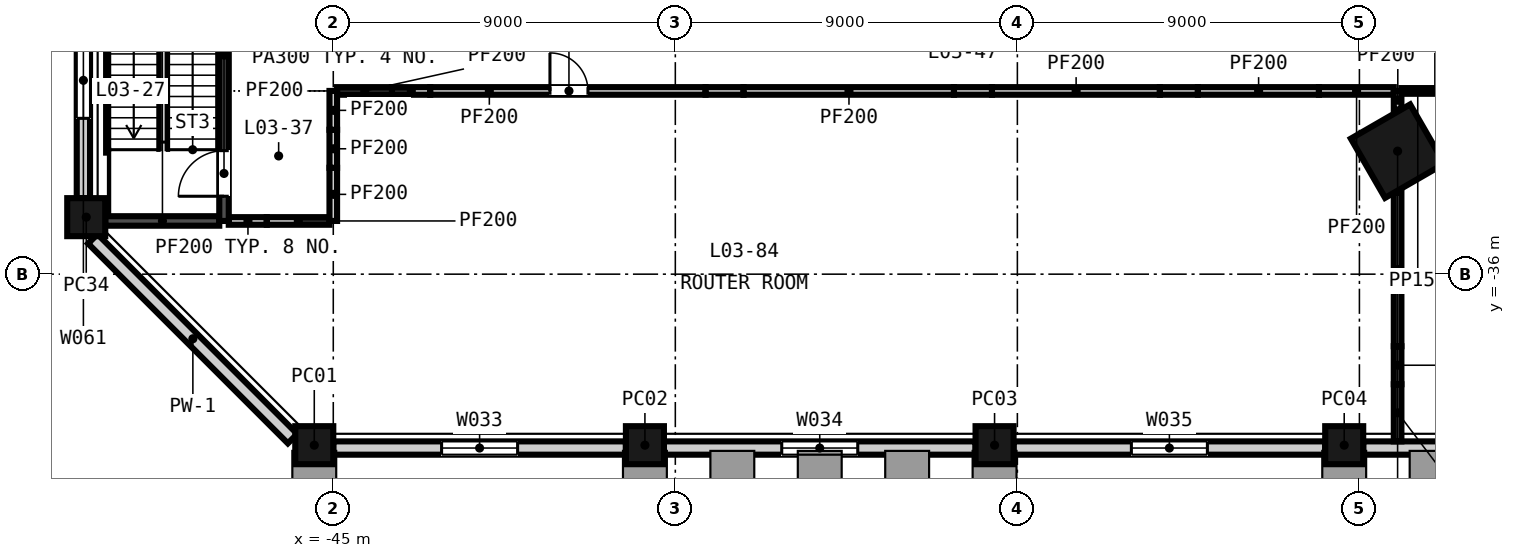
"""IFC4 building model, lengths in metres.
Left out: names, types, materials, properties, quantities, classifications, styles, units other than length and angle.
Written with IfcOpenShell. Run it as: python <this file> out.ifc"""

import sys

from ifc_helpers import new_model, si_unit, direction, frame, frame_2d, origin, origin_2d, place, context, subcontext, project, spatial, rectangle, extrude, element, fill, save


model = new_model("IFC4")
c1 = context("Model", 3, precision=1e-05, world=origin(), true_north=direction((0.0, 1.0)))
c2 = subcontext(c1, "Body", "Model", "MODEL_VIEW")
j1 = project(units=[si_unit("LENGTHUNIT", "METRE"), si_unit("PLANEANGLEUNIT", "RADIAN")], contexts=[c1])
p1 = place(None, origin())
s1 = spatial("IfcSite", under=j1, at=p1, CompositionType="ELEMENT")
p2 = place(p1, origin())
s2 = spatial("IfcBuilding", under=s1, at=p2, CompositionType="ELEMENT")
p3 = place(p2, frame((0.0, 0.0, 22.5)))
s3 = spatial("IfcBuildingStorey", under=s2, at=p3, CompositionType="ELEMENT", Elevation=22.5)
p4 = place(p3, frame((-16.995, -32.763, -0.3), z_axis=(0.0, 0.0, 1.0), x_axis=(0.5, -0.866025403784, 0.0)))
e1 = element("IfcColumn", 1, at=p4, inside=s3, PredefinedType="COLUMN", context=c2, shape_type="SweptSolid", body=[
    extrude(rectangle(XDim=1.8, YDim=1.8, at=origin_2d()), origin(), (0.0, 0.0, 1.0), 4.5),
])
for number, where, z_axis, x_axis in (
    (2, (-45.5, -40.5, -0.3), (0.0, 0.0, 1.0), (1.0, 0.0, 0.0)),
    (3, (-36.8, -40.5, -0.3), (0.0, 0.0, 1.0), (1.0, 0.0, 0.0)),
    (4, (-27.6, -40.5, -0.3), (0.0, 0.0, 1.0), (1.0, 0.0, 0.0)),
    (5, (-18.4, -40.5, -0.3), (0.0, 0.0, 1.0), (1.0, 0.0, 0.0)),
    (6, (-51.5, -34.5, -0.3), (0.0, 0.0, 1.0), (0.0, -1.0, 0.0)),
):
    element("IfcColumn", number, at=place(p3, frame(where, z_axis=z_axis, x_axis=x_axis)), inside=s3, PredefinedType="COLUMN", context=c2, shape_type="SweptSolid", body=[
        extrude(rectangle(XDim=1.0, YDim=1.0, at=origin_2d()), origin(), (0.0, 0.0, 1.0), 4.5),
    ])
p5 = place(p3, frame((-45.0, -40.575, -0.3), z_axis=(0.0, 0.0, 1.0), x_axis=(1.0, 0.0, 0.0)))
e7 = element("IfcWall", 7, at=p5, inside=s3, PredefinedType="SOLIDWALL", context=c2, shape_type="SweptSolid", body=[
    extrude(rectangle(XDim=7.7, YDim=0.35, at=frame_2d((3.85, 0.0))), origin(), (0.0, 0.0, 1.0), 3.6),
])
p6 = place(p5, frame((2.85, 0.0, 1.2)))
e8 = element("IfcOpeningElement", 8, at=p6, cuts=e7, PredefinedType="OPENING", context=c2, shape_type="SweptSolid", body=[
    extrude(rectangle(XDim=2.0, YDim=2.35, at=frame_2d((1.0, 1.175))), frame((0.0, 0.185, 0.0), z_axis=(0.0, -1.0, 0.0), x_axis=(1.0, 0.0, 0.0)), (0.0, 0.0, 1.0), 0.37),
])
p7 = place(p3, frame((-36.3, -40.575, -0.3), z_axis=(0.0, 0.0, 1.0), x_axis=(1.0, 0.0, 0.0)))
e9 = element("IfcWall", 9, at=p7, inside=s3, PredefinedType="SOLIDWALL", context=c2, shape_type="SweptSolid", body=[
    extrude(rectangle(XDim=8.2, YDim=0.35, at=frame_2d((4.1, 0.0))), origin(), (0.0, 0.0, 1.0), 3.6),
])
p8 = place(p7, frame((3.1, 0.0, 1.2)))
e10 = element("IfcOpeningElement", 10, at=p8, cuts=e9, PredefinedType="OPENING", context=c2, shape_type="SweptSolid", body=[
    extrude(rectangle(XDim=2.0, YDim=2.35, at=frame_2d((1.0, 1.175))), frame((0.0, 0.185, 0.0), z_axis=(0.0, -1.0, 0.0), x_axis=(1.0, 0.0, 0.0)), (0.0, 0.0, 1.0), 0.37),
])
p9 = place(p3, frame((-27.1, -40.575, -0.3), z_axis=(0.0, 0.0, 1.0), x_axis=(1.0, 0.0, 0.0)))
e11 = element("IfcWall", 11, at=p9, inside=s3, PredefinedType="SOLIDWALL", context=c2, shape_type="SweptSolid", body=[
    extrude(rectangle(XDim=8.2, YDim=0.35, at=frame_2d((4.1, 0.0))), origin(), (0.0, 0.0, 1.0), 3.6),
])
p10 = place(p9, frame((3.1, 0.0, 1.2)))
e12 = element("IfcOpeningElement", 12, at=p10, cuts=e11, PredefinedType="OPENING", context=c2, shape_type="SweptSolid", body=[
    extrude(rectangle(XDim=2.0, YDim=2.35, at=frame_2d((1.0, 1.175))), frame((0.0, 0.185, 0.0), z_axis=(0.0, -1.0, 0.0), x_axis=(1.0, 0.0, 0.0)), (0.0, 0.0, 1.0), 0.37),
])
p11 = place(p3, frame((-17.9, -40.575, -0.3), z_axis=(0.0, 0.0, 1.0), x_axis=(1.0, 0.0, 0.0)))
e13 = element("IfcWall", 13, at=p11, inside=s3, PredefinedType="SOLIDWALL", context=c2, shape_type="SweptSolid", body=[
    extrude(rectangle(XDim=8.2, YDim=0.35, at=frame_2d((4.1, 0.0))), origin(), (0.0, 0.0, 1.0), 3.6),
])
p12 = place(p11, frame((3.1, 0.0, 1.2)))
e14 = element("IfcOpeningElement", 14, at=p12, cuts=e13, PredefinedType="OPENING", context=c2, shape_type="SweptSolid", body=[
    extrude(rectangle(XDim=2.0, YDim=2.35, at=frame_2d((1.0, 1.175))), frame((0.0, 0.185, 0.0), z_axis=(0.0, -1.0, 0.0), x_axis=(1.0, 0.0, 0.0)), (0.0, 0.0, 1.0), 0.37),
])
p13 = place(p3, frame((-51.575, -27.8, -0.3), z_axis=(0.0, 0.0, 1.0), x_axis=(0.0, -1.0, 0.0)))
e15 = element("IfcWall", 15, at=p13, inside=s3, PredefinedType="SOLIDWALL", context=c2, shape_type="SweptSolid", body=[
    extrude(rectangle(XDim=6.2, YDim=0.35, at=frame_2d((3.1, 0.0))), origin(), (0.0, 0.0, 1.0), 3.6),
])
p14 = place(p13, frame((2.1, 0.0, 1.2)))
e16 = element("IfcOpeningElement", 16, at=p14, cuts=e15, PredefinedType="OPENING", context=c2, shape_type="SweptSolid", body=[
    extrude(rectangle(XDim=2.0, YDim=2.35, at=frame_2d((1.0, 1.175))), frame((0.0, 0.185, 0.0), z_axis=(0.0, -1.0, 0.0), x_axis=(1.0, 0.0, 0.0)), (0.0, 0.0, 1.0), 0.37),
])
p15 = place(p3, frame((-51.327, -35.072, -0.3), z_axis=(0.0, 0.0, 1.0), x_axis=(0.707106781187, -0.707106781187, 0.0)))
e17 = element("IfcWall", 17, at=p15, inside=s3, PredefinedType="SOLIDWALL", context=c2, shape_type="SweptSolid", body=[
    extrude(rectangle(XDim=7.433, YDim=0.35, at=frame_2d((3.716, 0.0))), origin(), (0.0, 0.0, 1.0), 3.6),
])
p16 = place(p3, frame((-51.0, -34.6, 0.0), z_axis=(0.0, 0.0, 1.0), x_axis=(1.0, 0.0, 0.0)))
e18 = element("IfcWall", 18, at=p16, inside=s3, PredefinedType="SHEAR", context=c2, shape_type="SweptSolid", body=[
    extrude(rectangle(XDim=3.0, YDim=0.25, at=frame_2d((1.5, 0.0))), origin(), (0.0, 0.0, 1.0), 4.2),
])
p17 = place(p3, frame((-47.75, -34.6, 0.0), z_axis=(0.0, 0.0, 1.0), x_axis=(1.0, 0.0, 0.0)))
e19 = element("IfcWall", 19, at=p17, inside=s3, PredefinedType="PARTITIONING", context=c2, shape_type="SweptSolid", body=[
    extrude(rectangle(XDim=1.0, YDim=0.2, at=frame_2d((0.5, 0.0))), origin(), (0.0, 0.0, 1.0), 3.111),
])
p18 = place(p3, frame((-46.75, -34.6, 0.0), z_axis=(0.0, 0.0, 1.0), x_axis=(1.0, 0.0, 0.0)))
e20 = element("IfcWall", 20, at=p18, inside=s3, PredefinedType="PARTITIONING", context=c2, shape_type="SweptSolid", body=[
    extrude(rectangle(XDim=1.65, YDim=0.2, at=frame_2d((0.825, 0.0))), origin(), (0.0, 0.0, 1.0), 4.2),
])
p19 = place(p3, frame((-44.9, -31.179, 0.0), z_axis=(0.0, 0.0, 1.0), x_axis=(1.0, 0.0, 0.0)))
e21 = element("IfcWall", 21, at=p19, inside=s3, PredefinedType="PARTITIONING", context=c2, shape_type="SweptSolid", body=[
    extrude(rectangle(XDim=1.445, YDim=0.2, at=frame_2d((0.723, 0.0))), origin(), (0.0, 0.0, 1.0), 4.2),
])
p20 = place(p3, frame((-43.455, -31.179, 0.0), z_axis=(0.0, 0.0, 1.0), x_axis=(1.0, 0.0, 0.0)))
e22 = element("IfcWall", 22, at=p20, inside=s3, PredefinedType="PARTITIONING", context=c2, shape_type="SweptSolid", body=[
    extrude(rectangle(XDim=1.006, YDim=0.2, at=frame_2d((0.503, 0.0))), origin(), (0.0, 0.0, 1.0), 3.111),
])
p21 = place(p3, frame((-42.449, -31.179, 0.0), z_axis=(0.0, 0.0, 1.0), x_axis=(1.0, 0.0, 0.0)))
e23 = element("IfcWall", 23, at=p21, inside=s3, PredefinedType="PARTITIONING", context=c2, shape_type="SweptSolid", body=[
    extrude(rectangle(XDim=7.245, YDim=0.2, at=frame_2d((3.623, 0.0))), origin(), (0.0, 0.0, 1.0), 4.2),
])
p22 = place(p21, frame((3.15, 0.0, 0.0)))
e24 = element("IfcOpeningElement", 24, at=p22, cuts=e23, PredefinedType="OPENING", context=c2, shape_type="SweptSolid", body=[
    extrude(rectangle(XDim=1.0, YDim=2.1, at=frame_2d((0.5, 1.05))), frame((0.0, 0.11, 0.0), z_axis=(0.0, -1.0, 0.0), x_axis=(1.0, 0.0, 0.0)), (0.0, 0.0, 1.0), 0.22),
])
p23 = place(p3, frame((-35.204, -31.179, 0.0), z_axis=(0.0, 0.0, 1.0), x_axis=(1.0, 0.0, 0.0)))
e25 = element("IfcWall", 25, at=p23, inside=s3, PredefinedType="PARTITIONING", context=c2, shape_type="SweptSolid", body=[
    extrude(rectangle(XDim=1.0, YDim=0.2, at=frame_2d((0.5, 0.0))), origin(), (0.0, 0.0, 1.0), 3.111),
])
p24 = place(p3, frame((-34.204, -31.179, 0.0), z_axis=(0.0, 0.0, 1.0), x_axis=(1.0, 0.0, 0.0)))
e26 = element("IfcWall", 26, at=p24, inside=s3, PredefinedType="PARTITIONING", context=c2, shape_type="SweptSolid", body=[
    extrude(rectangle(XDim=5.536, YDim=0.2, at=frame_2d((2.768, 0.0))), origin(), (0.0, 0.0, 1.0), 4.2),
])
p25 = place(p3, frame((-28.668, -31.179, 0.0), z_axis=(0.0, 0.0, 1.0), x_axis=(1.0, 0.0, 0.0)))
e27 = element("IfcWall", 27, at=p25, inside=s3, PredefinedType="PARTITIONING", context=c2, shape_type="SweptSolid", body=[
    extrude(rectangle(XDim=1.0, YDim=0.2, at=frame_2d((0.5, 0.0))), origin(), (0.0, 0.0, 1.0), 3.286),
])
p26 = place(p3, frame((-27.668, -31.179, 0.0), z_axis=(0.0, 0.0, 1.0), x_axis=(1.0, 0.0, 0.0)))
e28 = element("IfcWall", 28, at=p26, inside=s3, PredefinedType="PARTITIONING", context=c2, shape_type="SweptSolid", body=[
    extrude(rectangle(XDim=4.418, YDim=0.2, at=frame_2d((2.209, 0.0))), origin(), (0.0, 0.0, 1.0), 4.2),
])
p27 = place(p3, frame((-23.25, -31.179, 0.0), z_axis=(0.0, 0.0, 1.0), x_axis=(1.0, 0.0, 0.0)))
e29 = element("IfcWall", 29, at=p27, inside=s3, PredefinedType="PARTITIONING", context=c2, shape_type="SweptSolid", body=[
    extrude(rectangle(XDim=1.0, YDim=0.2, at=frame_2d((0.5, 0.0))), origin(), (0.0, 0.0, 1.0), 3.441),
])
p28 = place(p3, frame((-22.25, -31.179, 0.0), z_axis=(0.0, 0.0, 1.0), x_axis=(1.0, 0.0, 0.0)))
e30 = element("IfcWall", 30, at=p28, inside=s3, PredefinedType="PARTITIONING", context=c2, shape_type="SweptSolid", body=[
    extrude(rectangle(XDim=3.185, YDim=0.2, at=frame_2d((1.593, 0.0))), origin(), (0.0, 0.0, 1.0), 4.2),
])
p29 = place(p3, frame((-19.065, -31.179, 0.0), z_axis=(0.0, 0.0, 1.0), x_axis=(1.0, 0.0, 0.0)))
e31 = element("IfcWall", 31, at=p29, inside=s3, PredefinedType="PARTITIONING", context=c2, shape_type="SweptSolid", body=[
    extrude(rectangle(XDim=1.97, YDim=0.2, at=frame_2d((0.985, 0.0))), origin(), (0.0, 0.0, 1.0), 3.2),
])
p30 = place(p3, frame((-16.895, -31.179, 0.0), z_axis=(0.0, 0.0, 1.0), x_axis=(1.0, 0.0, 0.0)))
e32 = element("IfcWall", 32, at=p30, inside=s3, PredefinedType="PARTITIONING", context=c2, shape_type="SweptSolid", body=[
    extrude(rectangle(XDim=2.663, YDim=0.15, at=frame_2d((1.332, 0.0))), origin(), (0.0, 0.0, 1.0), 4.2),
])
p31 = place(p30, frame((0.9, 0.0, 0.0)))
e33 = element("IfcOpeningElement", 33, at=p31, cuts=e32, PredefinedType="OPENING", context=c2, shape_type="SweptSolid", body=[
    extrude(rectangle(XDim=1.0, YDim=2.1, at=frame_2d((0.5, 1.05))), frame((0.0, 0.085, 0.0), z_axis=(0.0, -1.0, 0.0), x_axis=(1.0, 0.0, 0.0)), (0.0, 0.0, 1.0), 0.17),
])
p32 = place(p3, frame((-47.875, -34.6, 0.0), z_axis=(0.0, 0.0, 1.0), x_axis=(0.0, 1.0, 0.0)))
e34 = element("IfcWall", 34, at=p32, inside=s3, PredefinedType="SHEAR", context=c2, shape_type="SweptSolid", body=[
    extrude(rectangle(XDim=6.821, YDim=0.25, at=frame_2d((3.411, 0.0))), origin(), (0.0, 0.0, 1.0), 4.2),
])
p33 = place(p32, frame((0.65, 0.0, 0.0)))
e35 = element("IfcOpeningElement", 35, at=p33, cuts=e34, PredefinedType="OPENING", context=c2, shape_type="SweptSolid", body=[
    extrude(rectangle(XDim=1.2, YDim=2.1, at=frame_2d((0.6, 1.05))), frame((0.0, 0.135, 0.0), z_axis=(0.0, -1.0, 0.0), x_axis=(1.0, 0.0, 0.0)), (0.0, 0.0, 1.0), 0.27),
])
p34 = place(p3, frame((-45.0, -34.6, 0.0), z_axis=(0.0, 0.0, 1.0), x_axis=(0.0, 1.0, 0.0)))
e36 = element("IfcWall", 36, at=p34, inside=s3, PredefinedType="PARTITIONING", context=c2, shape_type="SweptSolid", body=[
    extrude(rectangle(XDim=1.399, YDim=0.2, at=frame_2d((0.7, 0.0))), origin(), (0.0, 0.0, 1.0), 4.2),
])
p35 = place(p3, frame((-45.0, -33.201, 0.0), z_axis=(0.0, 0.0, 1.0), x_axis=(0.0, 1.0, 0.0)))
e37 = element("IfcWall", 37, at=p35, inside=s3, PredefinedType="PARTITIONING", context=c2, shape_type="SweptSolid", body=[
    extrude(rectangle(XDim=1.0, YDim=0.2, at=frame_2d((0.5, 0.0))), origin(), (0.0, 0.0, 1.0), 3.111),
])
p36 = place(p3, frame((-45.0, -32.201, 0.0), z_axis=(0.0, 0.0, 1.0), x_axis=(0.0, 1.0, 0.0)))
e38 = element("IfcWall", 38, at=p36, inside=s3, PredefinedType="PARTITIONING", context=c2, shape_type="SweptSolid", body=[
    extrude(rectangle(XDim=1.022, YDim=0.2, at=frame_2d((0.511, 0.0))), origin(), (0.0, 0.0, 1.0), 4.2),
])
p37 = place(p3, frame((-16.995, -40.4, 0.0), z_axis=(0.0, 0.0, 1.0), x_axis=(0.0, 1.0, 0.0)))
e39 = element("IfcWall", 39, at=p37, inside=s3, PredefinedType="PARTITIONING", context=c2, shape_type="SweptSolid", body=[
    extrude(rectangle(XDim=1.504, YDim=0.2, at=frame_2d((0.752, 0.0))), origin(), (0.0, 0.0, 1.0), 4.2),
])
p38 = place(p3, frame((-16.995, -38.896, 0.0), z_axis=(0.0, 0.0, 1.0), x_axis=(0.0, 1.0, 0.0)))
e40 = element("IfcWall", 40, at=p38, inside=s3, PredefinedType="PARTITIONING", context=c2, shape_type="SweptSolid", body=[
    extrude(rectangle(XDim=1.0, YDim=0.2, at=frame_2d((0.5, 0.0))), origin(), (0.0, 0.0, 1.0), 3.676),
])
p39 = place(p3, frame((-16.995, -37.896, 0.0), z_axis=(0.0, 0.0, 1.0), x_axis=(0.0, 1.0, 0.0)))
e41 = element("IfcWall", 41, at=p39, inside=s3, PredefinedType="PARTITIONING", context=c2, shape_type="SweptSolid", body=[
    extrude(rectangle(XDim=4.036, YDim=0.2, at=frame_2d((2.018, 0.0))), origin(), (0.0, 0.0, 1.0), 4.2),
])
p40 = place(p3, frame((-16.995, -31.666, 0.0), z_axis=(0.0, 0.0, 1.0), x_axis=(0.0, 1.0, 0.0)))
e42 = element("IfcWall", 42, at=p40, inside=s3, PredefinedType="PARTITIONING", context=c2, shape_type="SweptSolid", body=[
    extrude(rectangle(XDim=0.487, YDim=0.2, at=frame_2d((0.244, 0.0))), origin(), (0.0, 0.0, 1.0), 4.2),
])
p41 = place(p6, origin())
e43 = element("IfcWindow", 43, at=p41, inside=s3, PartitioningType="SINGLE_PANEL", PredefinedType="WINDOW", context=c2, shape_type="SweptSolid", body=[
    extrude(rectangle(XDim=2.0, YDim=2.35, at=frame_2d((1.0, 1.175))), frame((0.0, 0.03, 0.0), z_axis=(0.0, -1.0, 0.0), x_axis=(1.0, 0.0, 0.0)), (0.0, 0.0, 1.0), 0.06),
])
fill(e8, e43)
p42 = place(p8, origin())
e44 = element("IfcWindow", 44, at=p42, inside=s3, PartitioningType="SINGLE_PANEL", PredefinedType="WINDOW", context=c2, shape_type="SweptSolid", body=[
    extrude(rectangle(XDim=2.0, YDim=2.35, at=frame_2d((1.0, 1.175))), frame((0.0, 0.03, 0.0), z_axis=(0.0, -1.0, 0.0), x_axis=(1.0, 0.0, 0.0)), (0.0, 0.0, 1.0), 0.06),
])
fill(e10, e44)
p43 = place(p10, origin())
e45 = element("IfcWindow", 45, at=p43, inside=s3, PartitioningType="SINGLE_PANEL", PredefinedType="WINDOW", context=c2, shape_type="SweptSolid", body=[
    extrude(rectangle(XDim=2.0, YDim=2.35, at=frame_2d((1.0, 1.175))), frame((0.0, 0.03, 0.0), z_axis=(0.0, -1.0, 0.0), x_axis=(1.0, 0.0, 0.0)), (0.0, 0.0, 1.0), 0.06),
])
fill(e12, e45)
p44 = place(p14, origin())
e46 = element("IfcWindow", 46, at=p44, inside=s3, PartitioningType="SINGLE_PANEL", PredefinedType="WINDOW", context=c2, shape_type="SweptSolid", body=[
    extrude(rectangle(XDim=2.0, YDim=2.35, at=frame_2d((1.0, 1.175))), frame((0.0, 0.03, 0.0), z_axis=(0.0, -1.0, 0.0), x_axis=(1.0, 0.0, 0.0)), (0.0, 0.0, 1.0), 0.06),
])
fill(e16, e46)
p45 = place(p33, origin())
e47 = element("IfcDoor", 47, at=p45, inside=s3, OperationType="SINGLE_SWING_LEFT", PredefinedType="DOOR", context=c2, shape_type="SweptSolid", body=[
    extrude(rectangle(XDim=1.2, YDim=2.1, at=frame_2d((0.6, 1.05))), frame((0.0, 0.025, 0.0), z_axis=(0.0, -1.0, 0.0), x_axis=(1.0, 0.0, 0.0)), (0.0, 0.0, 1.0), 0.05),
])
fill(e35, e47)
p46 = place(p22, origin())
e48 = element("IfcDoor", 48, at=p46, inside=s3, OperationType="SINGLE_SWING_LEFT", PredefinedType="DOOR", context=c2, shape_type="SweptSolid", body=[
    extrude(rectangle(XDim=1.0, YDim=2.1, at=frame_2d((0.5, 1.05))), frame((0.0, 0.025, 0.0), z_axis=(0.0, -1.0, 0.0), x_axis=(1.0, 0.0, 0.0)), (0.0, 0.0, 1.0), 0.05),
])
fill(e24, e48)
save(model, sys.argv[1])
